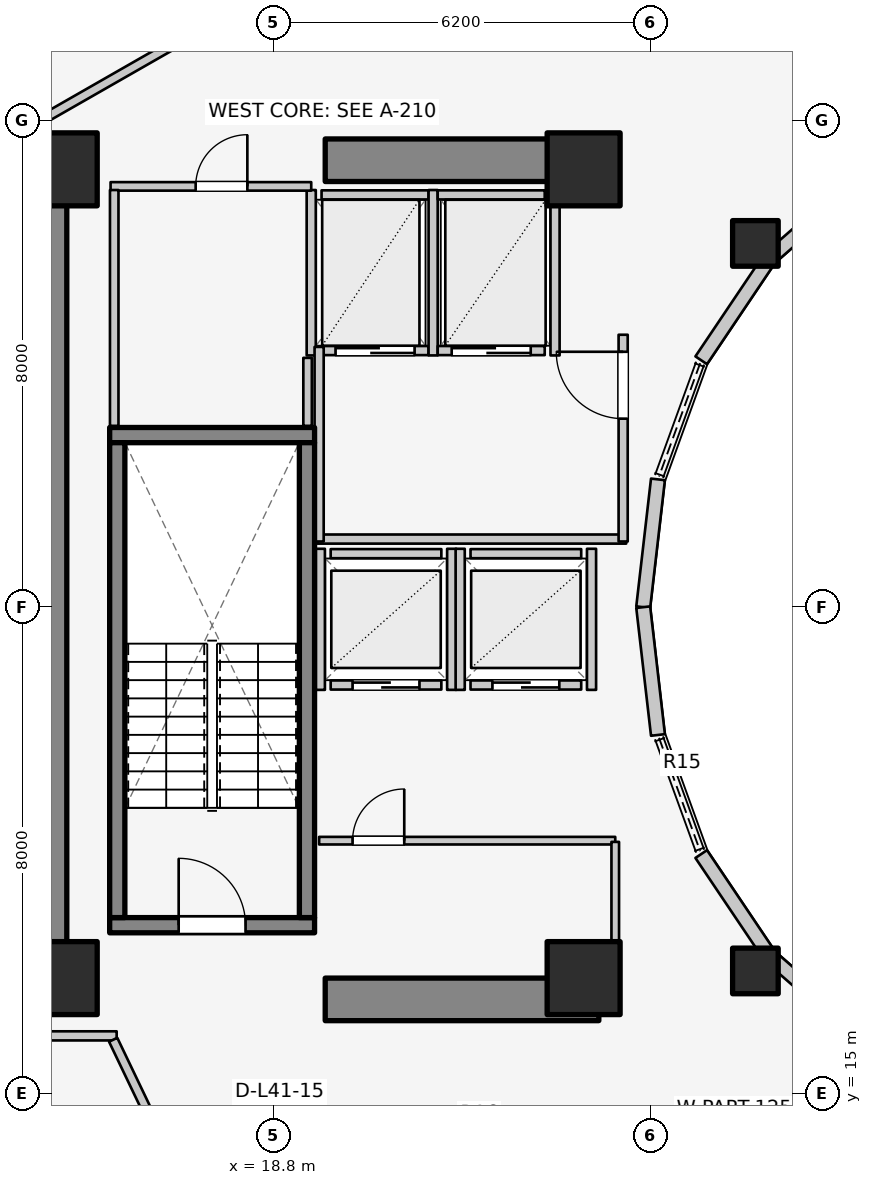
"""IFC4 building model, lengths in metres.
Left out: names, types, materials, properties, quantities, classifications, styles, units other than length and angle.
Written with IfcOpenShell. Run it as: python <this file> out.ifc"""

import sys

from ifc_helpers import new_model, si_unit, direction, frame, frame_2d, origin, origin_2d, place, context, subcontext, project, spatial, rectangle, extrude, element, fill, save


model = new_model("IFC4")
c1 = context("Model", 3, precision=1e-05, world=origin(), true_north=direction((0.0, 1.0)))
c2 = subcontext(c1, "Body", "Model", "MODEL_VIEW")
j1 = project(units=[si_unit("LENGTHUNIT", "METRE"), si_unit("PLANEANGLEUNIT", "RADIAN")], contexts=[c1])
p1 = place(None, origin())
s1 = spatial("IfcSite", under=j1, at=p1, CompositionType="ELEMENT")
p2 = place(p1, origin())
s2 = spatial("IfcBuilding", under=s1, at=p2, CompositionType="ELEMENT")
p3 = place(p2, frame((0.0, 0.0, 137.4)))
s3 = spatial("IfcBuildingStorey", under=s2, at=p3, CompositionType="ELEMENT", Elevation=137.4)
p4 = place(p3, frame((15.05, 17.05, 0.0), z_axis=(0.0, 0.0, 1.0), x_axis=(0.0, 1.0, 0.0)))
e1 = element("IfcWall", 1, at=p4, inside=s3, PredefinedType="SHEAR", context=c2, shape_type="SweptSolid", body=[
    extrude(rectangle(XDim=12.8, YDim=0.7, at=frame_2d((6.4, 0.0))), origin(), (0.0, 0.0, 1.0), 3.1),
])
for number, where, z_axis, x_axis in (
    (2, (19.65, 16.55, 0.0), (0.0, 0.0, 1.0), (1.0, 0.0, 0.0)),
    (3, (19.65, 30.35, 0.0), (0.0, 0.0, 1.0), (1.0, 0.0, 0.0)),
):
    element("IfcWall", number, at=place(p3, frame(where, z_axis=z_axis, x_axis=x_axis)), inside=s3, PredefinedType="SHEAR", context=c2, shape_type="SweptSolid", body=[
        extrude(rectangle(XDim=4.5, YDim=0.7, at=frame_2d((2.25, 0.0))), origin(), (0.0, 0.0, 1.0), 3.1),
    ])
p5 = place(p3, frame((16.105, 17.77, 0.0), z_axis=(0.0, 0.0, 1.0), x_axis=(1.0, 0.0, 0.0)))
e4 = element("IfcWall", 4, at=p5, inside=s3, PredefinedType="SOLIDWALL", context=c2, shape_type="SweptSolid", body=[
    extrude(rectangle(XDim=3.37, YDim=0.25, at=frame_2d((1.685, 0.0))), origin(), (0.0, 0.0, 1.0), 3.1),
])
p6 = place(p5, frame((1.135, 0.0, 0.0)))
e5 = element("IfcOpeningElement", 5, at=p6, cuts=e4, PredefinedType="OPENING", context=c2, shape_type="SweptSolid", body=[
    extrude(rectangle(XDim=1.1, YDim=2.1, at=frame_2d((0.55, 1.05))), frame((0.0, 0.135, 0.0), z_axis=(0.0, -1.0, 0.0), x_axis=(1.0, 0.0, 0.0)), (0.0, 0.0, 1.0), 0.27),
])
p7 = place(p3, frame((16.105, 25.83, 0.0), z_axis=(0.0, 0.0, 1.0), x_axis=(1.0, 0.0, 0.0)))
e6 = element("IfcWall", 6, at=p7, inside=s3, PredefinedType="SOLIDWALL", context=c2, shape_type="SweptSolid", body=[
    extrude(rectangle(XDim=3.37, YDim=0.25, at=frame_2d((1.685, 0.0))), origin(), (0.0, 0.0, 1.0), 3.1),
])
for number, where, z_axis, x_axis in (
    (7, (16.23, 17.895, 0.0), (0.0, 0.0, 1.0), (0.0, 1.0, 0.0)),
    (8, (19.35, 17.895, 0.0), (0.0, 0.0, 1.0), (0.0, 1.0, 0.0)),
):
    element("IfcWall", number, at=place(p3, frame(where, z_axis=z_axis, x_axis=x_axis)), inside=s3, PredefinedType="SOLIDWALL", context=c2, shape_type="SweptSolid", body=[
        extrude(rectangle(XDim=7.81, YDim=0.25, at=frame_2d((3.905, 0.0))), origin(), (0.0, 0.0, 1.0), 3.1),
    ])
for number, where, z_axis, x_axis in (
    (9, (15.3, 16.9, 0.0), (0.0, 0.0, 1.0), (1.0, 0.0, 0.0)),
    (10, (23.9, 16.9, 0.0), (0.0, 0.0, 1.0), (1.0, 0.0, 0.0)),
    (11, (23.9, 30.2, 0.0), (0.0, 0.0, 1.0), (1.0, 0.0, 0.0)),
    (12, (15.3, 30.2, 0.0), (0.0, 0.0, 1.0), (1.0, 0.0, 0.0)),
):
    element("IfcColumn", number, at=place(p3, frame(where, z_axis=z_axis, x_axis=x_axis)), inside=s3, PredefinedType="COLUMN", context=c2, shape_type="SweptSolid", body=[
        extrude(rectangle(XDim=1.2, YDim=1.2, at=origin_2d()), origin(), (0.0, 0.0, 1.0), 3.1),
    ])
for number, where, z_axis, x_axis in (
    (13, (26.725, 28.982, 0.0), (0.0, 0.0, 1.0), (1.0, 0.0, 0.0)),
    (14, (26.725, 17.018, 0.0), (0.0, 0.0, 1.0), (1.0, 0.0, 0.0)),
):
    element("IfcColumn", number, at=place(p3, frame(where, z_axis=z_axis, x_axis=x_axis)), inside=s3, PredefinedType="COLUMN", context=c2, shape_type="SweptSolid", body=[
        extrude(rectangle(XDim=0.75, YDim=0.75, at=origin_2d()), origin(), (0.0, 0.0, 1.0), 3.1),
    ])
p8 = place(p3, frame((28.44, 30.032, 0.0), z_axis=(0.0, 0.0, 1.0), x_axis=(-0.752576694707, -0.658504607869, 0.0)))
e15 = element("IfcWall", 15, at=p8, inside=s3, PredefinedType="STANDARD", context=c2, shape_type="SweptSolid", body=[
    extrude(rectangle(XDim=1.959, YDim=0.23, at=frame_2d((0.98, 0.0))), origin(), (0.0, 0.0, 1.0), 2.16),
])
p9 = place(p3, frame((26.965, 28.742, 0.0), z_axis=(0.0, 0.0, 1.0), x_axis=(-0.558197800898, -0.829707909492, 0.0)))
e16 = element("IfcWall", 16, at=p9, inside=s3, PredefinedType="STANDARD", context=c2, shape_type="SweptSolid", body=[
    extrude(rectangle(XDim=2.027, YDim=0.23, at=frame_2d((1.013, 0.0))), origin(), (0.0, 0.0, 1.0), 2.16),
])
for number, where, z_axis, x_axis in (
    (17, (25.123, 25.102, 0.0), (0.0, 0.0, 1.0), (-0.115, -0.993, 0.0)),
    (18, (24.88, 23.0, 0.0), (0.0, 0.0, 1.0), (0.115, -0.993, 0.0)),
):
    element("IfcWall", number, at=place(p3, frame(where, z_axis=z_axis, x_axis=x_axis)), inside=s3, PredefinedType="STANDARD", context=c2, shape_type="SweptSolid", body=[
        extrude(rectangle(XDim=2.115, YDim=0.23, at=frame_2d((1.058, 0.0))), origin(), (0.0, 0.0, 1.0), 2.84),
    ])
p10 = place(p3, frame((25.834, 18.94, 0.0), z_axis=(0.0, 0.0, 1.0), x_axis=(0.558197800898, -0.829707909492, 0.0)))
e19 = element("IfcWall", 19, at=p10, inside=s3, PredefinedType="STANDARD", context=c2, shape_type="SweptSolid", body=[
    extrude(rectangle(XDim=2.027, YDim=0.23, at=frame_2d((1.013, 0.0))), origin(), (0.0, 0.0, 1.0), 2.16),
])
p11 = place(p3, frame((26.965, 17.258, 0.0), z_axis=(0.0, 0.0, 1.0), x_axis=(0.752576694707, -0.658504607869, 0.0)))
e20 = element("IfcWall", 20, at=p11, inside=s3, PredefinedType="STANDARD", context=c2, shape_type="SweptSolid", body=[
    extrude(rectangle(XDim=1.959, YDim=0.23, at=frame_2d((0.98, 0.0))), origin(), (0.0, 0.0, 1.0), 2.16),
])
p12 = place(p3, frame((19.74, 21.72, 0.0), z_axis=(0.0, 0.0, 1.0), x_axis=(1.0, 0.0, 0.0)))
e21 = element("IfcWall", 21, at=p12, inside=s3, PredefinedType="SOLIDWALL", context=c2, shape_type="SweptSolid", body=[
    extrude(rectangle(XDim=1.82, YDim=0.15, at=frame_2d((0.91, 0.0))), origin(), (0.0, 0.0, 1.0), 2.855),
])
p13 = place(p12, frame((0.36, 0.0, 0.0)))
e22 = element("IfcOpeningElement", 22, at=p13, cuts=e21, PredefinedType="OPENING", context=c2, shape_type="SweptSolid", body=[
    extrude(rectangle(XDim=1.1, YDim=2.1, at=frame_2d((0.55, 1.05))), frame((0.0, 0.085, 0.0), z_axis=(0.0, -1.0, 0.0), x_axis=(1.0, 0.0, 0.0)), (0.0, 0.0, 1.0), 0.17),
])
p14 = place(p3, frame((19.74, 23.88, 0.0), z_axis=(0.0, 0.0, 1.0), x_axis=(1.0, 0.0, 0.0)))
e23 = element("IfcWall", 23, at=p14, inside=s3, PredefinedType="SOLIDWALL", context=c2, shape_type="SweptSolid", body=[
    extrude(rectangle(XDim=1.82, YDim=0.15, at=frame_2d((0.91, 0.0))), origin(), (0.0, 0.0, 1.0), 2.855),
])
for number, where, z_axis, x_axis in (
    (24, (19.57, 21.64, 0.0), (0.0, 0.0, 1.0), (0.0, 1.0, 0.0)),
    (25, (21.73, 21.64, 0.0), (0.0, 0.0, 1.0), (0.0, 1.0, 0.0)),
):
    element("IfcWall", number, at=place(p3, frame(where, z_axis=z_axis, x_axis=x_axis)), inside=s3, PredefinedType="SOLIDWALL", context=c2, shape_type="SweptSolid", body=[
        extrude(rectangle(XDim=2.32, YDim=0.15, at=frame_2d((1.16, 0.0))), origin(), (0.0, 0.0, 1.0), 2.855),
    ])
p15 = place(p3, frame((22.04, 21.72, 0.0), z_axis=(0.0, 0.0, 1.0), x_axis=(1.0, 0.0, 0.0)))
e26 = element("IfcWall", 26, at=p15, inside=s3, PredefinedType="SOLIDWALL", context=c2, shape_type="SweptSolid", body=[
    extrude(rectangle(XDim=1.82, YDim=0.15, at=frame_2d((0.91, 0.0))), origin(), (0.0, 0.0, 1.0), 2.12),
])
p16 = place(p15, frame((0.36, 0.0, 0.0)))
e27 = element("IfcOpeningElement", 27, at=p16, cuts=e26, PredefinedType="OPENING", context=c2, shape_type="SweptSolid", body=[
    extrude(rectangle(XDim=1.1, YDim=2.1, at=frame_2d((0.55, 1.05))), frame((0.0, 0.085, 0.0), z_axis=(0.0, -1.0, 0.0), x_axis=(1.0, 0.0, 0.0)), (0.0, 0.0, 1.0), 0.17),
])
p17 = place(p3, frame((22.04, 23.88, 0.0), z_axis=(0.0, 0.0, 1.0), x_axis=(1.0, 0.0, 0.0)))
e28 = element("IfcWall", 28, at=p17, inside=s3, PredefinedType="SOLIDWALL", context=c2, shape_type="SweptSolid", body=[
    extrude(rectangle(XDim=1.82, YDim=0.15, at=frame_2d((0.91, 0.0))), origin(), (0.0, 0.0, 1.0), 2.12),
])
p18 = place(p3, frame((21.87, 21.64, 0.0), z_axis=(0.0, 0.0, 1.0), x_axis=(0.0, 1.0, 0.0)))
e29 = element("IfcWall", 29, at=p18, inside=s3, PredefinedType="SOLIDWALL", context=c2, shape_type="SweptSolid", body=[
    extrude(rectangle(XDim=2.32, YDim=0.15, at=frame_2d((1.16, 0.0))), origin(), (0.0, 0.0, 1.0), 2.855),
])
p19 = place(p3, frame((24.03, 21.64, 0.0), z_axis=(0.0, 0.0, 1.0), x_axis=(0.0, 1.0, 0.0)))
e30 = element("IfcWall", 30, at=p19, inside=s3, PredefinedType="SOLIDWALL", context=c2, shape_type="SweptSolid", body=[
    extrude(rectangle(XDim=2.32, YDim=0.15, at=frame_2d((1.16, 0.0))), origin(), (0.0, 0.0, 1.0), 2.12),
])
p20 = place(p3, frame((19.59, 27.22, 0.0), z_axis=(0.0, 0.0, 1.0), x_axis=(1.0, 0.0, 0.0)))
e31 = element("IfcWall", 31, at=p20, inside=s3, PredefinedType="SOLIDWALL", context=c2, shape_type="SweptSolid", body=[
    extrude(rectangle(XDim=1.76, YDim=0.15, at=frame_2d((0.88, 0.0))), origin(), (0.0, 0.0, 1.0), 2.855),
])
p21 = place(p20, frame((0.23, 0.0, 0.0)))
e32 = element("IfcOpeningElement", 32, at=p21, cuts=e31, PredefinedType="OPENING", context=c2, shape_type="SweptSolid", body=[
    extrude(rectangle(XDim=1.3, YDim=2.1, at=frame_2d((0.65, 1.05))), frame((0.0, 0.085, 0.0), z_axis=(0.0, -1.0, 0.0), x_axis=(1.0, 0.0, 0.0)), (0.0, 0.0, 1.0), 0.17),
])
p22 = place(p3, frame((19.59, 29.78, 0.0), z_axis=(0.0, 0.0, 1.0), x_axis=(1.0, 0.0, 0.0)))
e33 = element("IfcWall", 33, at=p22, inside=s3, PredefinedType="SOLIDWALL", context=c2, shape_type="SweptSolid", body=[
    extrude(rectangle(XDim=1.76, YDim=0.15, at=frame_2d((0.88, 0.0))), origin(), (0.0, 0.0, 1.0), 2.855),
])
for number, where, z_axis, x_axis in (
    (34, (19.42, 27.14, 0.0), (0.0, 0.0, 1.0), (0.0, 1.0, 0.0)),
    (35, (21.425, 27.14, 0.0), (0.0, 0.0, 1.0), (0.0, 1.0, 0.0)),
):
    element("IfcWall", number, at=place(p3, frame(where, z_axis=z_axis, x_axis=x_axis)), inside=s3, PredefinedType="SOLIDWALL", context=c2, shape_type="SweptSolid", body=[
        extrude(rectangle(XDim=2.72, YDim=0.15, at=frame_2d((1.36, 0.0))), origin(), (0.0, 0.0, 1.0), 2.855),
    ])
p23 = place(p3, frame((21.5, 27.22, 0.0), z_axis=(0.0, 0.0, 1.0), x_axis=(1.0, 0.0, 0.0)))
e36 = element("IfcWall", 36, at=p23, inside=s3, PredefinedType="SOLIDWALL", context=c2, shape_type="SweptSolid", body=[
    extrude(rectangle(XDim=1.76, YDim=0.15, at=frame_2d((0.88, 0.0))), origin(), (0.0, 0.0, 1.0), 2.855),
])
p24 = place(p23, frame((0.23, 0.0, 0.0)))
e37 = element("IfcOpeningElement", 37, at=p24, cuts=e36, PredefinedType="OPENING", context=c2, shape_type="SweptSolid", body=[
    extrude(rectangle(XDim=1.3, YDim=2.1, at=frame_2d((0.65, 1.05))), frame((0.0, 0.085, 0.0), z_axis=(0.0, -1.0, 0.0), x_axis=(1.0, 0.0, 0.0)), (0.0, 0.0, 1.0), 0.17),
])
p25 = place(p3, frame((21.5, 29.78, 0.0), z_axis=(0.0, 0.0, 1.0), x_axis=(1.0, 0.0, 0.0)))
e38 = element("IfcWall", 38, at=p25, inside=s3, PredefinedType="SOLIDWALL", context=c2, shape_type="SweptSolid", body=[
    extrude(rectangle(XDim=1.76, YDim=0.15, at=frame_2d((0.88, 0.0))), origin(), (0.0, 0.0, 1.0), 2.855),
])
p26 = place(p3, frame((23.43, 27.14, 0.0), z_axis=(0.0, 0.0, 1.0), x_axis=(0.0, 1.0, 0.0)))
e39 = element("IfcWall", 39, at=p26, inside=s3, PredefinedType="SOLIDWALL", context=c2, shape_type="SweptSolid", body=[
    extrude(rectangle(XDim=2.72, YDim=0.15, at=frame_2d((1.36, 0.0))), origin(), (0.0, 0.0, 1.0), 2.855),
])
p27 = place(p3, frame((19.52, 24.12, 0.0), z_axis=(0.0, 0.0, 1.0), x_axis=(1.0, 0.0, 0.0)))
e40 = element("IfcWall", 40, at=p27, inside=s3, PredefinedType="PARTITIONING", context=c2, shape_type="SweptSolid", body=[
    extrude(rectangle(XDim=5.08, YDim=0.15, at=frame_2d((2.54, 0.0))), origin(), (0.0, 0.0, 1.0), 2.12),
])
p28 = place(p3, frame((19.55, 24.08, 0.0), z_axis=(0.0, 0.0, 1.0), x_axis=(0.0, 1.0, 0.0)))
e41 = element("IfcWall", 41, at=p28, inside=s3, PredefinedType="PARTITIONING", context=c2, shape_type="SweptSolid", body=[
    extrude(rectangle(XDim=3.2, YDim=0.15, at=frame_2d((1.6, 0.0))), origin(), (0.0, 0.0, 1.0), 2.855),
])
p29 = place(p3, frame((24.55, 24.08, 0.0), z_axis=(0.0, 0.0, 1.0), x_axis=(0.0, 1.0, 0.0)))
e42 = element("IfcWall", 42, at=p29, inside=s3, PredefinedType="PARTITIONING", context=c2, shape_type="SweptSolid", body=[
    extrude(rectangle(XDim=3.4, YDim=0.15, at=frame_2d((1.7, 0.0))), origin(), (0.0, 0.0, 1.0), 2.855),
])
p30 = place(p29, frame((2.02, 0.0, 0.0)))
e43 = element("IfcOpeningElement", 43, at=p30, cuts=e42, PredefinedType="OPENING", context=c2, shape_type="SweptSolid", body=[
    extrude(rectangle(XDim=1.1, YDim=2.1, at=frame_2d((0.55, 1.05))), frame((0.0, 0.085, 0.0), z_axis=(0.0, -1.0, 0.0), x_axis=(1.0, 0.0, 0.0)), (0.0, 0.0, 1.0), 0.17),
])
p31 = place(p3, frame((19.55, 19.16, 0.0), z_axis=(0.0, 0.0, 1.0), x_axis=(1.0, 0.0, 0.0)))
e44 = element("IfcWall", 44, at=p31, inside=s3, PredefinedType="PARTITIONING", context=c2, shape_type="SweptSolid", body=[
    extrude(rectangle(XDim=4.87, YDim=0.125, at=frame_2d((2.435, 0.0))), origin(), (0.0, 0.0, 1.0), 2.12),
])
p32 = place(p31, frame((0.55, 0.0, 0.0)))
e45 = element("IfcOpeningElement", 45, at=p32, cuts=e44, PredefinedType="OPENING", context=c2, shape_type="SweptSolid", body=[
    extrude(rectangle(XDim=0.85, YDim=2.05, at=frame_2d((0.425, 1.025))), frame((0.0, 0.073, 0.0), z_axis=(0.0, -1.0, 0.0), x_axis=(1.0, 0.0, 0.0)), (0.0, 0.0, 1.0), 0.145),
])
p33 = place(p3, frame((24.42, 17.1, 0.0), z_axis=(0.0, 0.0, 1.0), x_axis=(0.0, 1.0, 0.0)))
e46 = element("IfcWall", 46, at=p33, inside=s3, PredefinedType="PARTITIONING", context=c2, shape_type="SweptSolid", body=[
    extrude(rectangle(XDim=2.04, YDim=0.125, at=frame_2d((1.02, 0.0))), origin(), (0.0, 0.0, 1.0), 2.232),
])
p34 = place(p3, frame((16.12, 29.92, 0.0), z_axis=(0.0, 0.0, 1.0), x_axis=(1.0, 0.0, 0.0)))
e47 = element("IfcWall", 47, at=p34, inside=s3, PredefinedType="PLUMBINGWALL", context=c2, shape_type="SweptSolid", body=[
    extrude(rectangle(XDim=3.3, YDim=0.14, at=frame_2d((1.65, 0.0))), origin(), (0.0, 0.0, 1.0), 2.855),
])
p35 = place(p34, frame((1.399, 0.0, 0.0)))
e48 = element("IfcOpeningElement", 48, at=p35, cuts=e47, PredefinedType="OPENING", context=c2, shape_type="SweptSolid", body=[
    extrude(rectangle(XDim=0.85, YDim=2.05, at=frame_2d((0.425, 1.025))), frame((0.0, 0.08, 0.0), z_axis=(0.0, -1.0, 0.0), x_axis=(1.0, 0.0, 0.0)), (0.0, 0.0, 1.0), 0.16),
])
p36 = place(p3, frame((16.18, 25.98, 0.0), z_axis=(0.0, 0.0, 1.0), x_axis=(0.0, 1.0, 0.0)))
e49 = element("IfcWall", 49, at=p36, inside=s3, PredefinedType="PLUMBINGWALL", context=c2, shape_type="SweptSolid", body=[
    extrude(rectangle(XDim=3.88, YDim=0.14, at=frame_2d((1.94, 0.0))), origin(), (0.0, 0.0, 1.0), 2.855),
])
p37 = place(p3, frame((19.36, 25.98, 0.0), z_axis=(0.0, 0.0, 1.0), x_axis=(0.0, 1.0, 0.0)))
e50 = element("IfcWall", 50, at=p37, inside=s3, PredefinedType="PLUMBINGWALL", context=c2, shape_type="SweptSolid", body=[
    extrude(rectangle(XDim=1.12, YDim=0.14, at=frame_2d((0.56, 0.0))), origin(), (0.0, 0.0, 1.0), 2.855),
])
p38 = place(p3, frame((17.243, 32.305, 0.0), z_axis=(0.0, 0.0, 1.0), x_axis=(-0.867991349648, -0.496579315857, 0.0)))
e51 = element("IfcWall", 51, at=p38, inside=s3, PredefinedType="PARTITIONING", context=c2, shape_type="SweptSolid", body=[
    extrude(rectangle(XDim=2.567, YDim=0.15, at=frame_2d((1.283, 0.0))), origin(), (0.0, 0.0, 1.0), 2.22),
])
p39 = place(p3, frame((10.96, 15.95, 0.0), z_axis=(0.0, 0.0, 1.0), x_axis=(1.0, 0.0, 0.0)))
e52 = element("IfcWall", 52, at=p39, inside=s3, PredefinedType="PARTITIONING", context=c2, shape_type="SweptSolid", body=[
    extrude(rectangle(XDim=5.26, YDim=0.15, at=frame_2d((2.63, 0.0))), origin(), (0.0, 0.0, 1.0), 2.22),
])
p40 = place(p3, frame((17.222, 13.675, 0.0), z_axis=(0.0, 0.0, 1.0), x_axis=(-0.431973389813, 0.901886351207, 0.0)))
e53 = element("IfcWall", 53, at=p40, inside=s3, PredefinedType="PARTITIONING", context=c2, shape_type="SweptSolid", body=[
    extrude(rectangle(XDim=2.452, YDim=0.15, at=frame_2d((1.226, 0.0))), origin(), (0.0, 0.0, 1.0), 2.855),
])
p41 = place(p3, frame((28.45, 15.985, 0.0), z_axis=(0.0, 0.0, 1.0), x_axis=(-0.525627246902, -0.850714991824, 0.0)))
e54 = element("IfcWall", 54, at=p41, inside=s3, PredefinedType="PARTITIONING", context=c2, shape_type="SweptSolid", body=[
    extrude(rectangle(XDim=2.901, YDim=0.125, at=frame_2d((1.451, 0.0))), origin(), (0.0, 0.0, 1.0), 2.299),
])
p42 = place(p6, origin())
e55 = element("IfcDoor", 55, at=p42, inside=s3, OperationType="SINGLE_SWING_LEFT", PredefinedType="DOOR", context=c2, shape_type="SweptSolid", body=[
    extrude(rectangle(XDim=1.1, YDim=2.1, at=frame_2d((0.55, 1.05))), frame((0.0, 0.025, 0.0), z_axis=(0.0, -1.0, 0.0), x_axis=(1.0, 0.0, 0.0)), (0.0, 0.0, 1.0), 0.05),
])
fill(e5, e55)
p43 = place(p13, origin())
e56 = element("IfcDoor", 56, at=p43, inside=s3, OperationType="DOUBLE_DOOR_SLIDING", PredefinedType="DOOR", context=c2, shape_type="SweptSolid", body=[
    extrude(rectangle(XDim=1.1, YDim=2.1, at=frame_2d((0.55, 1.05))), frame((0.0, 0.025, 0.0), z_axis=(0.0, -1.0, 0.0), x_axis=(1.0, 0.0, 0.0)), (0.0, 0.0, 1.0), 0.05),
])
fill(e22, e56)
p44 = place(p16, origin())
e57 = element("IfcDoor", 57, at=p44, inside=s3, OperationType="DOUBLE_DOOR_SLIDING", PredefinedType="DOOR", context=c2, shape_type="SweptSolid", body=[
    extrude(rectangle(XDim=1.1, YDim=2.1, at=frame_2d((0.55, 1.05))), frame((0.0, 0.025, 0.0), z_axis=(0.0, -1.0, 0.0), x_axis=(1.0, 0.0, 0.0)), (0.0, 0.0, 1.0), 0.05),
])
fill(e27, e57)
p45 = place(p21, origin())
e58 = element("IfcDoor", 58, at=p45, inside=s3, OperationType="DOUBLE_DOOR_SLIDING", PredefinedType="DOOR", context=c2, shape_type="SweptSolid", body=[
    extrude(rectangle(XDim=1.3, YDim=2.1, at=frame_2d((0.65, 1.05))), frame((0.0, 0.025, 0.0), z_axis=(0.0, -1.0, 0.0), x_axis=(1.0, 0.0, 0.0)), (0.0, 0.0, 1.0), 0.05),
])
fill(e32, e58)
p46 = place(p24, origin())
e59 = element("IfcDoor", 59, at=p46, inside=s3, OperationType="DOUBLE_DOOR_SLIDING", PredefinedType="DOOR", context=c2, shape_type="SweptSolid", body=[
    extrude(rectangle(XDim=1.3, YDim=2.1, at=frame_2d((0.65, 1.05))), frame((0.0, 0.025, 0.0), z_axis=(0.0, -1.0, 0.0), x_axis=(1.0, 0.0, 0.0)), (0.0, 0.0, 1.0), 0.05),
])
fill(e37, e59)
p47 = place(p30, origin())
e60 = element("IfcDoor", 60, at=p47, inside=s3, OperationType="SINGLE_SWING_RIGHT", PredefinedType="DOOR", context=c2, shape_type="SweptSolid", body=[
    extrude(rectangle(XDim=1.1, YDim=2.1, at=frame_2d((0.55, 1.05))), frame((0.0, 0.025, 0.0), z_axis=(0.0, -1.0, 0.0), x_axis=(1.0, 0.0, 0.0)), (0.0, 0.0, 1.0), 0.05),
])
fill(e43, e60)
p48 = place(p32, origin())
e61 = element("IfcDoor", 61, at=p48, inside=s3, OperationType="SINGLE_SWING_RIGHT", PredefinedType="DOOR", context=c2, shape_type="SweptSolid", body=[
    extrude(rectangle(XDim=0.85, YDim=2.05, at=frame_2d((0.425, 1.025))), frame((0.0, 0.025, 0.0), z_axis=(0.0, -1.0, 0.0), x_axis=(1.0, 0.0, 0.0)), (0.0, 0.0, 1.0), 0.05),
])
fill(e45, e61)
p49 = place(p35, origin())
e62 = element("IfcDoor", 62, at=p49, inside=s3, OperationType="SINGLE_SWING_RIGHT", PredefinedType="DOOR", context=c2, shape_type="SweptSolid", body=[
    extrude(rectangle(XDim=0.85, YDim=2.05, at=frame_2d((0.425, 1.025))), frame((0.0, 0.025, 0.0), z_axis=(0.0, -1.0, 0.0), x_axis=(1.0, 0.0, 0.0)), (0.0, 0.0, 1.0), 0.05),
])
fill(e48, e62)
save(model, sys.argv[1])
